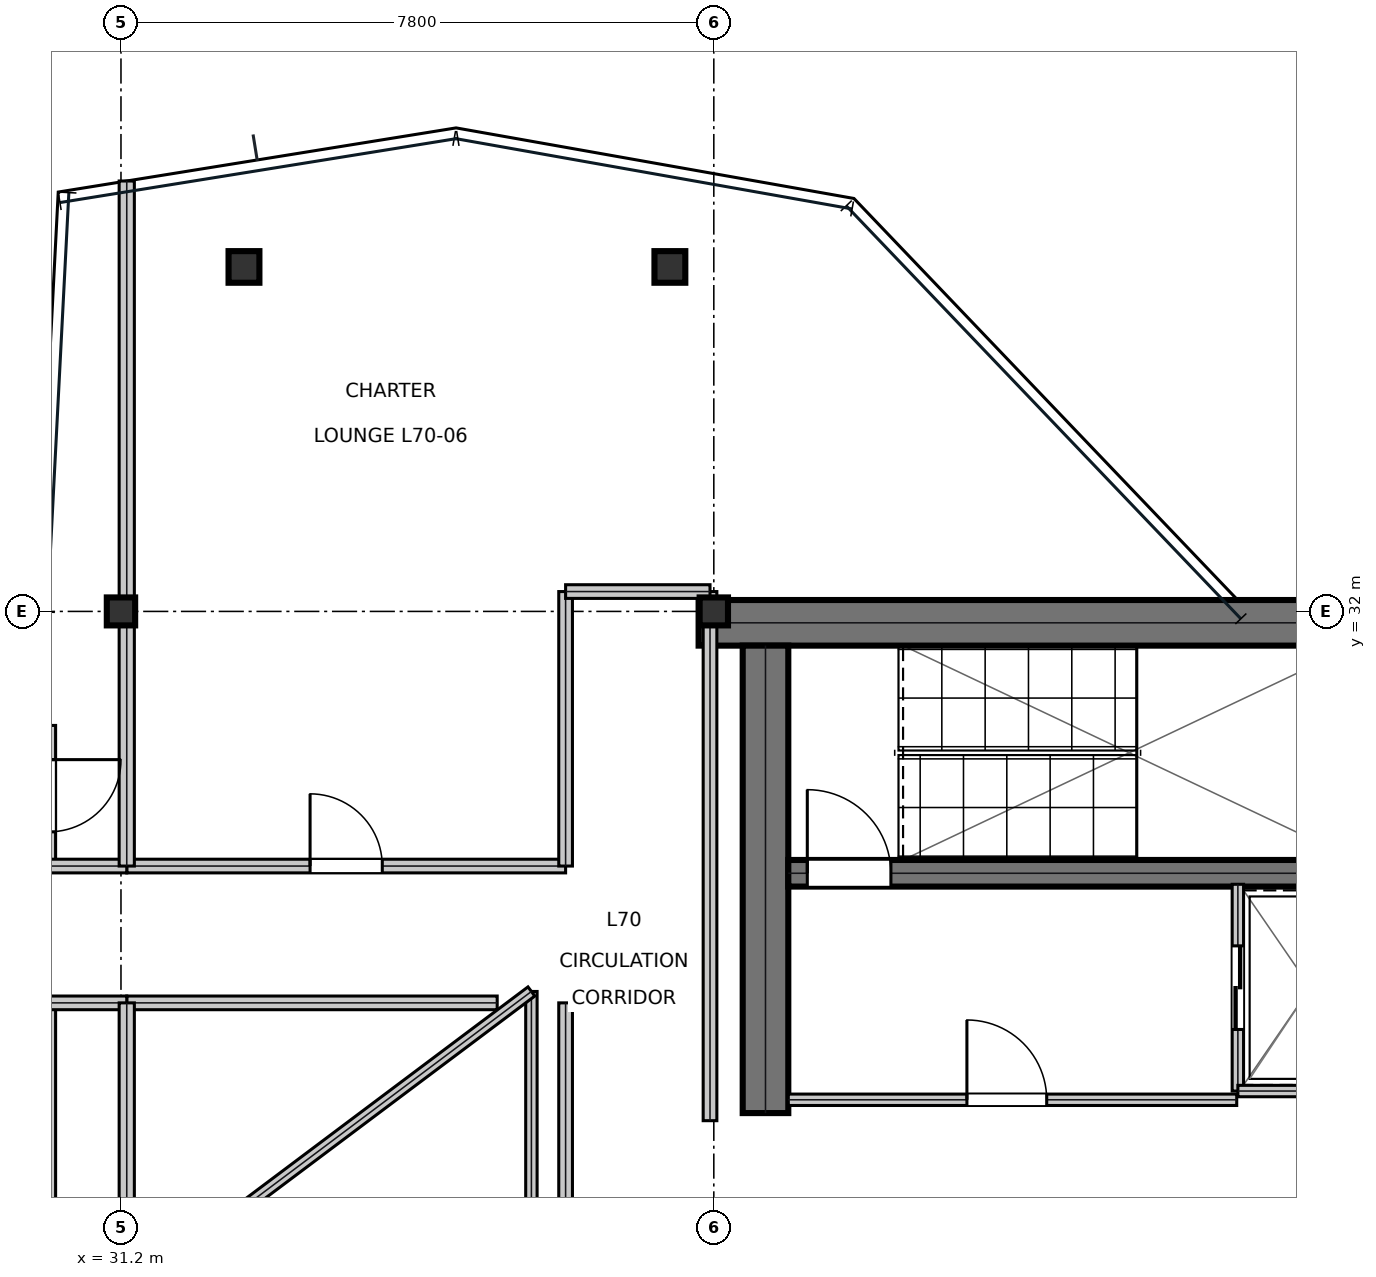
"""IFC4 building model, lengths in metres.
Left out: names, types, materials, properties, quantities, classifications, styles, units other than length and angle.
Written with IfcOpenShell. Run it as: python <this file> out.ifc"""

import sys

from ifc_helpers import new_model, si_unit, direction, frame, frame_2d, origin, origin_2d, place, context, subcontext, project, spatial, rectangle, i_section, extrude, element, fill, save


model = new_model("IFC4")
c1 = context("Model", 3, precision=1e-05, world=origin(), true_north=direction((0.0, 1.0)))
c2 = subcontext(c1, "Body", "Model", "MODEL_VIEW")
j1 = project(units=[si_unit("LENGTHUNIT", "METRE"), si_unit("PLANEANGLEUNIT", "RADIAN")], contexts=[c1])
p1 = place(None, origin())
s1 = spatial("IfcSite", under=j1, at=p1, CompositionType="ELEMENT")
p2 = place(p1, origin())
s2 = spatial("IfcBuilding", under=s1, at=p2, CompositionType="ELEMENT")
p3 = place(p2, frame((0.0, 0.0, 299.25)))
s3 = spatial("IfcBuildingStorey", under=s2, at=p3, CompositionType="ELEMENT", Elevation=299.25)
p4 = place(p3, frame((38.8, 31.85, 0.0), z_axis=(0.0, 0.0, 1.0), x_axis=(1.0, 0.0, 0.0)))
e1 = element("IfcWall", 1, at=p4, inside=s3, PredefinedType="SHEAR", context=c2, shape_type="SweptSolid", body=[
    extrude(rectangle(XDim=16.0, YDim=0.6, at=frame_2d((8.0, 0.0))), origin(), (0.0, 0.0, 1.0), 3.81),
])
p5 = place(p3, frame((39.68, 25.4, 0.0), z_axis=(0.0, 0.0, 1.0), x_axis=(0.0, 1.0, 0.0)))
e2 = element("IfcWall", 2, at=p5, inside=s3, PredefinedType="SHEAR", context=c2, shape_type="SweptSolid", body=[
    extrude(rectangle(XDim=6.15, YDim=0.6, at=frame_2d((3.075, 0.0))), origin(), (0.0, 0.0, 1.0), 3.81),
])
p6 = place(p3, frame((39.98, 28.555, 0.0), z_axis=(0.0, 0.0, 1.0), x_axis=(1.0, 0.0, 0.0)))
e3 = element("IfcWall", 3, at=p6, inside=s3, PredefinedType="SHEAR", context=c2, shape_type="SweptSolid", body=[
    extrude(rectangle(XDim=7.71, YDim=0.35, at=frame_2d((3.855, 0.0))), origin(), (0.0, 0.0, 1.0), 3.81),
])
p7 = place(p6, frame((0.25, 0.0, 0.0)))
e4 = element("IfcOpeningElement", 4, at=p7, cuts=e3, PredefinedType="OPENING", context=c2, shape_type="SweptSolid", body=[
    extrude(rectangle(XDim=1.1, YDim=2.15, at=frame_2d((0.55, 1.075))), frame((0.0, 0.185, 0.0), z_axis=(0.0, -1.0, 0.0), x_axis=(1.0, 0.0, 0.0)), (0.0, 0.0, 1.0), 0.37),
])
for number, where, z_axis, x_axis in (
    (5, (31.2, 32.0, 0.0), (0.0, 0.0, 1.0), (1.0, 0.0, 0.0)),
    (6, (39.0, 32.0, 0.0), (0.0, 0.0, 1.0), (1.0, 0.0, 0.0)),
):
    element("IfcColumn", number, at=place(p3, frame(where, z_axis=z_axis, x_axis=x_axis)), inside=s3, PredefinedType="COLUMN", context=c2, shape_type="SweptSolid", body=[
        extrude(i_section(OverallWidth=0.373, OverallDepth=0.368, WebThickness=0.015, FlangeThickness=0.024, at=origin_2d()), origin(), (0.0, 0.0, 1.0), 4.044),
    ])
p8 = place(p3, frame((32.818, 36.532, 0.016), z_axis=(0.013968236766, -0.029819148922, 0.999457706318), x_axis=(0.905569653976, 0.424197597586, 0.0)))
e7 = element("IfcColumn", 7, at=p8, inside=s3, PredefinedType="COLUMN", context=c2, shape_type="SweptSolid", body=[
    extrude(i_section(OverallWidth=0.406, OverallDepth=0.416, WebThickness=0.03, FlangeThickness=0.048, at=origin_2d()), origin(), (0.0, 0.0, 1.0), 4.02),
])
p9 = place(p3, frame((38.422, 36.532, 0.016), z_axis=(-0.004980404192, -0.029821688517, 0.99954282673), x_axis=(0.986339577116, -0.164724735893, 0.0)))
e8 = element("IfcColumn", 8, at=p9, inside=s3, PredefinedType="COLUMN", context=c2, shape_type="SweptSolid", body=[
    extrude(i_section(OverallWidth=0.406, OverallDepth=0.416, WebThickness=0.03, FlangeThickness=0.048, at=origin_2d()), origin(), (0.0, 0.0, 1.0), 4.02),
])
p10 = place(p3, frame((39.98, 25.575, 0.0), z_axis=(0.0, 0.0, 1.0), x_axis=(1.0, 0.0, 0.0)))
e9 = element("IfcWall", 9, at=p10, inside=s3, PredefinedType="PARTITIONING", context=c2, shape_type="SweptSolid", body=[
    extrude(rectangle(XDim=5.9, YDim=0.15, at=frame_2d((2.95, 0.0))), origin(), (0.0, 0.0, 1.0), 3.81),
])
p11 = place(p10, frame((2.35, 0.0, 0.0)))
e10 = element("IfcOpeningElement", 10, at=p11, cuts=e9, PredefinedType="OPENING", context=c2, shape_type="SweptSolid", body=[
    extrude(rectangle(XDim=1.05, YDim=2.15, at=frame_2d((0.525, 1.075))), frame((0.0, 0.085, 0.0), z_axis=(0.0, -1.0, 0.0), x_axis=(1.0, 0.0, 0.0)), (0.0, 0.0, 1.0), 0.17),
])
p12 = place(p3, frame((45.895, 25.69, 0.0), z_axis=(0.0, 0.0, 1.0), x_axis=(0.0, 1.0, 0.0)))
e11 = element("IfcWall", 11, at=p12, inside=s3, PredefinedType="PARTITIONING", context=c2, shape_type="SweptSolid", body=[
    extrude(rectangle(XDim=2.72, YDim=0.15, at=frame_2d((1.36, 0.0))), origin(), (0.0, 0.0, 1.0), 3.81),
])
p13 = place(p12, frame((0.81, 0.0, 0.0)))
e12 = element("IfcOpeningElement", 12, at=p13, cuts=e11, PredefinedType="OPENING", context=c2, shape_type="SweptSolid", body=[
    extrude(rectangle(XDim=1.1, YDim=2.15, at=frame_2d((0.55, 1.075))), frame((0.0, 0.085, 0.0), z_axis=(0.0, -1.0, 0.0), x_axis=(1.0, 0.0, 0.0)), (0.0, 0.0, 1.0), 0.17),
])
p14 = place(p3, frame((45.895, 25.69, 0.0), z_axis=(0.0, 0.0, 1.0), x_axis=(1.0, 0.0, 0.0)))
e13 = element("IfcWall", 13, at=p14, inside=s3, PredefinedType="PARTITIONING", context=c2, shape_type="SweptSolid", body=[
    extrude(rectangle(XDim=1.915, YDim=0.15, at=frame_2d((0.958, 0.0))), origin(), (0.0, 0.0, 1.0), 3.81),
])
p15 = place(p3, frame((37.05, 15.739, 0.0), z_axis=(0.0, 0.0, 1.0), x_axis=(0.0, 1.0, 0.0)))
e14 = element("IfcWall", 14, at=p15, inside=s3, PredefinedType="SOLIDWALL", context=c2, shape_type="SweptSolid", body=[
    extrude(rectangle(XDim=11.111, YDim=0.18, at=frame_2d((5.556, 0.0))), origin(), (0.0, 0.0, 1.0), 3.27),
])
p16 = place(p15, frame((3.281, 0.0, 0.0)))
e15 = element("IfcOpeningElement", 15, at=p16, cuts=e14, PredefinedType="OPENING", context=c2, shape_type="SweptSolid", body=[
    extrude(rectangle(XDim=0.95, YDim=2.15, at=frame_2d((0.475, 1.075))), frame((0.0, 0.1, 0.0), z_axis=(0.0, -1.0, 0.0), x_axis=(1.0, 0.0, 0.0)), (0.0, 0.0, 1.0), 0.2),
])
p17 = place(p3, frame((30.25, 17.5, 0.0), z_axis=(0.0, 0.0, 1.0), x_axis=(0.0, 1.0, 0.0)))
e16 = element("IfcWall", 16, at=p17, inside=s3, PredefinedType="SOLIDWALL", context=c2, shape_type="SweptSolid", body=[
    extrude(rectangle(XDim=9.35, YDim=0.18, at=frame_2d((4.675, 0.0))), origin(), (0.0, 0.0, 1.0), 3.27),
])
p18 = place(p17, frame((4.02, 0.0, 0.0)))
e17 = element("IfcOpeningElement", 17, at=p18, cuts=e16, PredefinedType="OPENING", context=c2, shape_type="SweptSolid", body=[
    extrude(rectangle(XDim=0.95, YDim=2.15, at=frame_2d((0.475, 1.075))), frame((0.0, 0.1, 0.0), z_axis=(0.0, -1.0, 0.0), x_axis=(1.0, 0.0, 0.0)), (0.0, 0.0, 1.0), 0.2),
])
p19 = place(p3, frame((30.25, 28.65, 0.0), z_axis=(0.0, 0.0, 1.0), x_axis=(0.0, 1.0, 0.0)))
e18 = element("IfcWall", 18, at=p19, inside=s3, PredefinedType="SOLIDWALL", context=c2, shape_type="SweptSolid", body=[
    extrude(rectangle(XDim=1.85, YDim=0.18, at=frame_2d((0.925, 0.0))), origin(), (0.0, 0.0, 1.0), 3.81),
])
p20 = place(p19, frame((0.45, 0.0, 0.0)))
e19 = element("IfcOpeningElement", 19, at=p20, cuts=e18, PredefinedType="OPENING", context=c2, shape_type="SweptSolid", body=[
    extrude(rectangle(XDim=0.95, YDim=2.15, at=frame_2d((0.475, 1.075))), frame((0.0, 0.1, 0.0), z_axis=(0.0, -1.0, 0.0), x_axis=(1.0, 0.0, 0.0)), (0.0, 0.0, 1.0), 0.2),
])
p21 = place(p3, frame((31.276, 28.65, 0.0), z_axis=(0.0, 0.0, 1.0), x_axis=(1.0, 0.0, 0.0)))
e20 = element("IfcWall", 20, at=p21, inside=s3, PredefinedType="SOLIDWALL", context=c2, shape_type="SweptSolid", body=[
    extrude(rectangle(XDim=5.774, YDim=0.18, at=frame_2d((2.887, 0.0))), origin(), (0.0, 0.0, 1.0), 3.81),
])
p22 = place(p21, frame((2.412, 0.0, 0.0)))
e21 = element("IfcOpeningElement", 21, at=p22, cuts=e20, PredefinedType="OPENING", context=c2, shape_type="SweptSolid", body=[
    extrude(rectangle(XDim=0.95, YDim=2.15, at=frame_2d((0.475, 1.075))), frame((0.0, 0.1, 0.0), z_axis=(0.0, -1.0, 0.0), x_axis=(1.0, 0.0, 0.0)), (0.0, 0.0, 1.0), 0.2),
])
p23 = place(p3, frame((31.276, 26.85, 0.0), z_axis=(0.0, 0.0, 1.0), x_axis=(1.0, 0.0, 0.0)))
e22 = element("IfcWall", 22, at=p23, inside=s3, PredefinedType="SOLIDWALL", context=c2, shape_type="SweptSolid", body=[
    extrude(rectangle(XDim=4.874, YDim=0.18, at=frame_2d((2.437, 0.0))), origin(), (0.0, 0.0, 1.0), 3.81),
])
for number, where, z_axis, x_axis in (
    (23, (30.25, 26.85, 0.0), (0.0, 0.0, 1.0), (1.0, 0.0, 0.0)),
    (24, (30.25, 28.65, 0.0), (0.0, 0.0, 1.0), (1.0, 0.0, 0.0)),
):
    element("IfcWall", number, at=place(p3, frame(where, z_axis=z_axis, x_axis=x_axis)), inside=s3, PredefinedType="SOLIDWALL", context=c2, shape_type="SweptSolid", body=[
        extrude(rectangle(XDim=1.026, YDim=0.18, at=frame_2d((0.513, 0.0))), origin(), (0.0, 0.0, 1.0), 3.27),
    ])
p24 = place(p3, frame((38.95, 25.3, 0.0), z_axis=(0.0, 0.0, 1.0), x_axis=(0.0, 1.0, 0.0)))
e25 = element("IfcWall", 25, at=p24, inside=s3, PredefinedType="SOLIDWALL", context=c2, shape_type="SweptSolid", body=[
    extrude(rectangle(XDim=6.961, YDim=0.18, at=frame_2d((3.48, 0.0))), origin(), (0.0, 0.0, 1.0), 3.27),
])
p25 = place(p3, frame((37.05, 28.65, 0.0), z_axis=(0.0, 0.0, 1.0), x_axis=(0.0, 1.0, 0.0)))
e26 = element("IfcWall", 26, at=p25, inside=s3, PredefinedType="SOLIDWALL", context=c2, shape_type="SweptSolid", body=[
    extrude(rectangle(XDim=3.611, YDim=0.18, at=frame_2d((1.806, 0.0))), origin(), (0.0, 0.0, 1.0), 3.27),
])
p26 = place(p3, frame((37.05, 32.261, 0.0), z_axis=(0.0, 0.0, 1.0), x_axis=(1.0, 0.0, 0.0)))
e27 = element("IfcWall", 27, at=p26, inside=s3, PredefinedType="SOLIDWALL", context=c2, shape_type="SweptSolid", body=[
    extrude(rectangle(XDim=1.9, YDim=0.18, at=frame_2d((0.95, 0.0))), origin(), (0.0, 0.0, 1.0), 3.27),
])
p27 = place(p3, frame((31.276, 10.337, 0.0), z_axis=(0.0, 0.0, 1.0), x_axis=(0.0, 1.0, 0.0)))
e28 = element("IfcWall", 28, at=p27, inside=s3, PredefinedType="SOLIDWALL", context=c2, shape_type="SweptSolid", body=[
    extrude(rectangle(XDim=16.513, YDim=0.2, at=frame_2d((8.256, 0.0))), origin(), (0.0, 0.0, 1.0), 3.27),
])
p28 = place(p3, frame((31.276, 28.65, 0.0), z_axis=(0.0, 0.0, 1.0), x_axis=(0.0, 1.0, 0.0)))
e29 = element("IfcWall", 29, at=p28, inside=s3, PredefinedType="SOLIDWALL", context=c2, shape_type="SweptSolid", body=[
    extrude(rectangle(XDim=9.013, YDim=0.2, at=frame_2d((4.506, 0.0))), origin(), (0.0, 0.0, 1.0), 3.27),
])
p29 = place(p3, frame((36.6, 21.0, 0.0), z_axis=(0.0, 0.0, 1.0), x_axis=(0.0, 1.0, 0.0)))
e30 = element("IfcWall", 30, at=p29, inside=s3, PredefinedType="MOVABLE", context=c2, shape_type="SweptSolid", body=[
    extrude(rectangle(XDim=6.0, YDim=0.15, at=frame_2d((3.0, 0.0))), origin(), (0.0, 0.0, 1.0), 3.81),
])
p30 = place(p3, frame((36.6, 27.0, 0.0), z_axis=(0.0, 0.0, 1.0), x_axis=(-0.8, -0.6, 0.0)))
e31 = element("IfcWall", 31, at=p30, inside=s3, PredefinedType="MOVABLE", context=c2, shape_type="SweptSolid", body=[
    extrude(rectangle(XDim=5.0, YDim=0.15, at=frame_2d((2.5, 0.0))), origin(), (0.0, 0.0, 1.0), 3.81),
])
p31 = place(p11, origin())
e32 = element("IfcDoor", 32, at=p31, inside=s3, OperationType="SINGLE_SWING_LEFT", PredefinedType="DOOR", context=c2, shape_type="SweptSolid", body=[
    extrude(rectangle(XDim=1.05, YDim=2.15, at=frame_2d((0.525, 1.075))), frame((0.0, 0.025, 0.0), z_axis=(0.0, -1.0, 0.0), x_axis=(1.0, 0.0, 0.0)), (0.0, 0.0, 1.0), 0.05),
])
fill(e10, e32)
p32 = place(p13, frame((1.1, 0.0, 0.0), z_axis=(0.0, 0.0, 1.0), x_axis=(-1.0, 0.0, 0.0)))
e33 = element("IfcDoor", 33, at=p32, inside=s3, OperationType="DOUBLE_DOOR_SLIDING", PredefinedType="DOOR", context=c2, shape_type="SweptSolid", body=[
    extrude(rectangle(XDim=1.1, YDim=2.15, at=frame_2d((0.55, 1.075))), frame((0.0, 0.025, 0.0), z_axis=(0.0, -1.0, 0.0), x_axis=(1.0, 0.0, 0.0)), (0.0, 0.0, 1.0), 0.05),
])
fill(e12, e33)
p33 = place(p22, origin())
e34 = element("IfcDoor", 34, at=p33, inside=s3, OperationType="SINGLE_SWING_LEFT", PredefinedType="DOOR", context=c2, shape_type="SweptSolid", body=[
    extrude(rectangle(XDim=0.95, YDim=2.15, at=frame_2d((0.475, 1.075))), frame((0.0, 0.025, 0.0), z_axis=(0.0, -1.0, 0.0), x_axis=(1.0, 0.0, 0.0)), (0.0, 0.0, 1.0), 0.05),
])
fill(e21, e34)
p34 = place(p7, origin())
e35 = element("IfcDoor", 35, at=p34, inside=s3, OperationType="SINGLE_SWING_LEFT", PredefinedType="DOOR", context=c2, shape_type="SweptSolid", body=[
    extrude(rectangle(XDim=1.1, YDim=2.15, at=frame_2d((0.55, 1.075))), frame((0.0, 0.025, 0.0), z_axis=(0.0, -1.0, 0.0), x_axis=(1.0, 0.0, 0.0)), (0.0, 0.0, 1.0), 0.05),
])
fill(e4, e35)
save(model, sys.argv[1])
